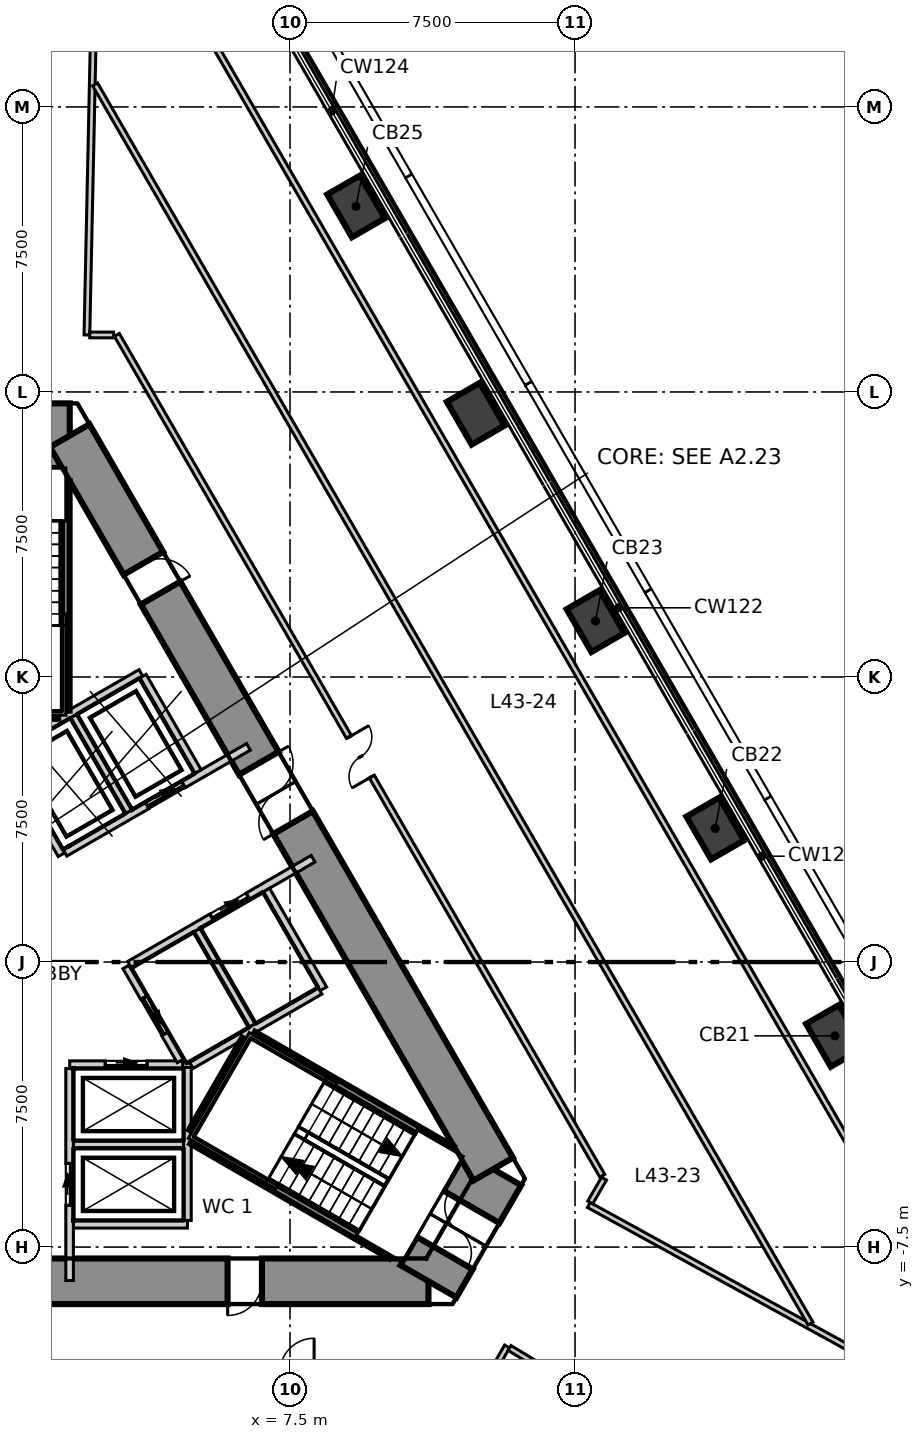
"""IFC4 building model, lengths in metres.
Left out: names, types, materials, properties, quantities, classifications, styles, units other than length and angle.
Written with IfcOpenShell. Run it as: python <this file> out.ifc"""

import sys

from ifc_helpers import new_model, si_unit, direction, frame, frame_2d, origin, origin_2d, place, context, subcontext, project, spatial, polyline, rectangle, outline, extrude, element, fill, save


model = new_model("IFC4")
c1 = context("Model", 3, precision=1e-05, world=origin(), true_north=direction((0.0, 1.0)))
c2 = subcontext(c1, "Body", "Model", "MODEL_VIEW")
j1 = project(units=[si_unit("LENGTHUNIT", "METRE"), si_unit("PLANEANGLEUNIT", "RADIAN")], contexts=[c1])
p1 = place(None, origin())
s1 = spatial("IfcSite", under=j1, at=p1, CompositionType="ELEMENT")
p2 = place(p1, origin())
s2 = spatial("IfcBuilding", under=s1, at=p2, CompositionType="ELEMENT")
p3 = place(p2, frame((0.0, 0.0, 185.3)))
s3 = spatial("IfcBuildingStorey", under=s2, at=p3, CompositionType="ELEMENT", Elevation=185.3)
p4 = place(p3, frame((1.703, 13.85, -0.6), z_axis=(0.0, 0.0, 1.0), x_axis=(-1.0, 0.0, 0.0)))
e1 = element("IfcWall", 1, at=p4, inside=s3, PredefinedType="SHEAR", context=c2, shape_type="SweptSolid", body=[
    extrude(outline(polyline([(-0.202, -0.85), (1.703, -0.85), (3.608, -0.85), (3.204, 0.85), (1.703, 0.85), (0.202, 0.85), (-0.202, -0.85)])), origin(), (0.0, 0.0, 1.0), 6.3),
])
p5 = place(p4, frame((0.859, 0.0, 0.6)))
e2 = element("IfcOpeningElement", 2, at=p5, cuts=e1, PredefinedType="OPENING", context=c2, shape_type="SweptSolid", body=[
    extrude(rectangle(XDim=1.4, YDim=2.1, at=frame_2d((0.7, 1.05))), frame((0.0, 0.86, 0.0), z_axis=(0.0, -1.0, 0.0), x_axis=(1.0, 0.0, 0.0)), (0.0, 0.0, 1.0), 1.72),
])
p6 = place(p3, frame((-11.143, -8.4, -0.6), z_axis=(0.0, 0.0, 1.0), x_axis=(1.0, 0.0, 0.0)))
e3 = element("IfcWall", 3, at=p6, inside=s3, PredefinedType="SHEAR", context=c2, shape_type="SweptSolid", body=[
    extrude(outline(polyline([(-0.635, -0.6), (1.328, -0.6), (3.291, -0.6), (5.254, -0.6), (7.217, -0.6), (9.18, -0.6), (11.143, -0.6), (13.106, -0.6), (15.069, -0.6), (17.032, -0.6), (18.995, -0.6), (20.958, -0.6), (22.921, -0.6), (21.651, 0.6), (19.74, 0.6), (17.83, 0.6), (15.919, 0.6), (14.009, 0.6), (12.098, 0.6), (10.188, 0.6), (8.277, 0.6), (6.367, 0.6), (4.456, 0.6), (2.546, 0.6), (0.635, 0.6), (-0.635, -0.6)])), origin(), (0.0, 0.0, 1.0), 6.3),
])
p7 = place(p6, frame((17.002, 0.0, 0.6)))
e4 = element("IfcOpeningElement", 4, at=p7, cuts=e3, PredefinedType="OPENING", context=c2, shape_type="SweptSolid", body=[
    extrude(rectangle(XDim=0.9, YDim=2.1, at=frame_2d((0.45, 1.05))), frame((0.0, 0.61, 0.0), z_axis=(0.0, -1.0, 0.0), x_axis=(1.0, 0.0, 0.0)), (0.0, 0.0, 1.0), 1.22),
])
p8 = place(p3, frame((11.143, -8.4, -0.6), z_axis=(0.0, 0.0, 1.0), x_axis=(0.499939613464, 0.86606026516, 0.0)))
e5 = element("IfcWall", 5, at=p8, inside=s3, PredefinedType="SHEAR", context=c2, shape_type="SweptSolid", body=[
    extrude(outline(polyline([(-0.202, -0.85), (1.703, -0.85), (3.608, -0.85), (3.204, 0.85), (1.703, 0.85), (0.202, 0.85), (-0.202, -0.85)])), origin(), (0.0, 0.0, 1.0), 6.3),
])
p9 = place(p8, frame((0.859, 0.0, 0.6)))
e6 = element("IfcOpeningElement", 6, at=p9, cuts=e5, PredefinedType="OPENING", context=c2, shape_type="SweptSolid", body=[
    extrude(rectangle(XDim=1.4, YDim=2.1, at=frame_2d((0.7, 1.05))), frame((0.0, 0.86, 0.0), z_axis=(0.0, -1.0, 0.0), x_axis=(1.0, 0.0, 0.0)), (0.0, 0.0, 1.0), 1.72),
])
p10 = place(p3, frame((12.846, -5.45, -0.6), z_axis=(0.0, 0.0, 1.0), x_axis=(-0.500005991004, 0.866021944849, 0.0)))
e7 = element("IfcWall", 7, at=p10, inside=s3, PredefinedType="SHEAR", context=c2, shape_type="SweptSolid", body=[
    extrude(outline(polyline([(-0.635, -0.6), (1.328, -0.6), (3.291, -0.6), (5.254, -0.6), (7.217, -0.6), (9.18, -0.6), (11.143, -0.6), (13.106, -0.6), (15.069, -0.6), (17.032, -0.6), (18.995, -0.6), (20.958, -0.6), (22.921, -0.6), (21.651, 0.6), (19.74, 0.6), (17.83, 0.6), (15.919, 0.6), (14.009, 0.6), (12.098, 0.6), (10.188, 0.6), (8.277, 0.6), (6.367, 0.6), (4.456, 0.6), (2.546, 0.6), (0.635, 0.6), (-0.635, -0.6)])), origin(), (0.0, 0.0, 1.0), 6.3),
])
p11 = place(p10, frame((10.531, 0.0, 0.6)))
e8 = element("IfcOpeningElement", 8, at=p11, cuts=e7, PredefinedType="OPENING", context=c2, shape_type="SweptSolid", body=[
    extrude(rectangle(XDim=1.8, YDim=2.1, at=frame_2d((0.9, 1.05))), frame((0.0, 0.61, 0.0), z_axis=(0.0, -1.0, 0.0), x_axis=(1.0, 0.0, 0.0)), (0.0, 0.0, 1.0), 1.22),
])
p12 = place(p10, frame((17.506, 0.0, 0.6)))
e9 = element("IfcOpeningElement", 9, at=p12, cuts=e7, PredefinedType="OPENING", context=c2, shape_type="SweptSolid", body=[
    extrude(rectangle(XDim=0.9, YDim=2.1, at=frame_2d((0.45, 1.05))), frame((0.0, 0.61, 0.0), z_axis=(0.0, -1.0, 0.0), x_axis=(1.0, 0.0, 0.0)), (0.0, 0.0, 1.0), 1.22),
])
for number, where, z_axis, x_axis in (
    (10, (21.838, -1.942, -0.6), (0.0, 0.0, 1.0), (-0.5, 0.866, 0.0)),
    (11, (18.688, 3.514, -0.6), (0.0, 0.0, 1.0), (-0.5, 0.866, 0.0)),
    (12, (15.538, 8.971, -0.6), (0.0, 0.0, 1.0), (-0.5, 0.866, 0.0)),
    (13, (12.387, 14.427, -0.6), (0.0, 0.0, 1.0), (-0.5, 0.866, 0.0)),
    (14, (9.237, 19.883, -0.6), (0.0, 0.0, 1.0), (-0.5, 0.866, 0.0)),
):
    element("IfcColumn", number, at=place(p3, frame(where, z_axis=z_axis, x_axis=x_axis)), inside=s3, PredefinedType="COLUMN", context=c2, shape_type="SweptSolid", body=[
        extrude(rectangle(XDim=1.3, YDim=1.0, at=origin_2d()), origin(), (0.0, 0.0, 1.0), 6.3),
    ])
p13 = place(p3, frame((2.155, 16.5, 0.0), z_axis=(0.0, 0.0, 1.0), x_axis=(0.021421622411, 0.999770530719, 0.0)))
e15 = element("IfcWall", 15, at=p13, inside=s3, PredefinedType="PARTITIONING", context=c2, shape_type="SweptSolid", body=[
    extrude(rectangle(XDim=11.157, YDim=0.15, at=frame_2d((5.579, 0.0))), origin(), (0.0, 0.0, 1.0), 5.0),
])
p14 = place(p3, frame((2.98, 28.52, 0.0), z_axis=(0.0, 0.0, 1.0), x_axis=(0.500012382508, -0.866018254622, 0.0)))
e16 = element("IfcWall", 16, at=p14, inside=s3, PredefinedType="PARTITIONING", context=c2, shape_type="SweptSolid", body=[
    extrude(rectangle(XDim=46.505, YDim=0.15, at=frame_2d((23.252, 0.0))), origin(), (0.0, 0.0, 1.0), 5.7),
])
p15 = place(p3, frame((15.362, -6.392, 0.0), z_axis=(0.0, 0.0, 1.0), x_axis=(0.876310300544, -0.481747088378, 0.0)))
e17 = element("IfcWall", 17, at=p15, inside=s3, PredefinedType="PARTITIONING", context=c2, shape_type="SweptSolid", body=[
    extrude(rectangle(XDim=10.974, YDim=0.15, at=frame_2d((5.487, 0.0))), origin(), (0.0, 0.0, 1.0), 5.0),
])
p16 = place(p15, frame((8.33, 0.0, 0.0)))
e18 = element("IfcOpeningElement", 18, at=p16, cuts=e17, PredefinedType="OPENING", context=c2, shape_type="SweptSolid", body=[
    extrude(rectangle(XDim=1.2, YDim=2.1, at=frame_2d((0.6, 1.05))), frame((0.0, 0.085, 0.0), z_axis=(0.0, -1.0, 0.0), x_axis=(1.0, 0.0, 0.0)), (0.0, 0.0, 1.0), 0.17),
])
p17 = place(p3, frame((15.4, -6.327, 0.0), z_axis=(0.0, 0.0, 1.0), x_axis=(0.500092185955, 0.865972173656, 0.0)))
e19 = element("IfcWall", 19, at=p17, inside=s3, PredefinedType="PARTITIONING", context=c2, shape_type="SweptSolid", body=[
    extrude(rectangle(XDim=0.724, YDim=0.15, at=frame_2d((0.362, 0.0))), origin(), (0.0, 0.0, 1.0), 5.7),
])
p18 = place(p3, frame((2.944, 16.5, 0.0), z_axis=(0.0, 0.0, 1.0), x_axis=(0.500001499409, -0.866024538099, 0.0)))
e20 = element("IfcWall", 20, at=p18, inside=s3, PredefinedType="PARTITIONING", context=c2, shape_type="SweptSolid", body=[
    extrude(rectangle(XDim=25.548, YDim=0.15, at=frame_2d((12.774, 0.0))), origin(), (0.0, 0.0, 1.0), 5.7),
])
p19 = place(p18, frame((12.217, 0.0, 0.0)))
e21 = element("IfcOpeningElement", 21, at=p19, cuts=e20, PredefinedType="OPENING", context=c2, shape_type="SweptSolid", body=[
    extrude(rectangle(XDim=1.2, YDim=2.1, at=frame_2d((0.6, 1.05))), frame((0.0, 0.085, 0.0), z_axis=(0.0, -1.0, 0.0), x_axis=(1.0, 0.0, 0.0)), (0.0, 0.0, 1.0), 0.17),
])
p20 = place(p3, frame((2.23, 16.5, 0.0), z_axis=(0.0, 0.0, 1.0), x_axis=(1.0, 0.0, 0.0)))
e22 = element("IfcWall", 22, at=p20, inside=s3, PredefinedType="PARTITIONING", context=c2, shape_type="SweptSolid", body=[
    extrude(rectangle(XDim=0.628, YDim=0.15, at=frame_2d((0.314, 0.0))), origin(), (0.0, 0.0, 1.0), 5.7),
])
p21 = place(p3, frame((2.371, 23.093, 0.0), z_axis=(0.0, 0.0, 1.0), x_axis=(0.500006092323, -0.866021886352, 0.0)))
e23 = element("IfcWall", 23, at=p21, inside=s3, PredefinedType="PARTITIONING", context=c2, shape_type="SweptSolid", body=[
    extrude(rectangle(XDim=37.651, YDim=0.15, at=frame_2d((18.826, 0.0))), origin(), (0.0, 0.0, 1.0), 5.7),
])
p22 = place(p3, frame((12.86, -10.725, 0.0), z_axis=(0.0, 0.0, 1.0), x_axis=(0.500133030451, 0.865948584993, 0.0)))
e24 = element("IfcWall", 24, at=p22, inside=s3, PredefinedType="PARTITIONING", context=c2, shape_type="SweptSolid", body=[
    extrude(rectangle(XDim=0.703, YDim=0.15, at=frame_2d((0.352, 0.0))), origin(), (0.0, 0.0, 1.0), 5.7),
])
p23 = place(p3, frame((13.276, -10.155, 0.0), z_axis=(0.0, 0.0, 1.0), x_axis=(0.855137762332, -0.518400817355, 0.0)))
e25 = element("IfcWall", 25, at=p23, inside=s3, PredefinedType="PARTITIONING", context=c2, shape_type="SweptSolid", body=[
    extrude(rectangle(XDim=6.115, YDim=0.15, at=frame_2d((3.057, 0.0))), origin(), (0.0, 0.0, 1.0), 5.0),
])
p24 = place(p3, frame((1.8, -4.8, 0.0), z_axis=(0.0, 0.0, 1.0), x_axis=(1.0, 0.0, 0.0)))
e26 = element("IfcWall", 26, at=p24, inside=s3, PredefinedType="SOLIDWALL", context=c2, shape_type="SweptSolid", body=[
    extrude(rectangle(XDim=2.9, YDim=0.2, at=frame_2d((1.45, 0.0))), origin(), (0.0, 0.0, 1.0), 5.7),
])
p25 = place(p3, frame((1.8, -6.9, 0.0), z_axis=(0.0, 0.0, 1.0), x_axis=(1.0, 0.0, 0.0)))
e27 = element("IfcWall", 27, at=p25, inside=s3, PredefinedType="SOLIDWALL", context=c2, shape_type="SweptSolid", body=[
    extrude(rectangle(XDim=3.0, YDim=0.2, at=frame_2d((1.5, 0.0))), origin(), (0.0, 0.0, 1.0), 5.7),
])
p26 = place(p3, frame((1.703, -2.7, 0.0), z_axis=(0.0, 0.0, 1.0), x_axis=(1.0, 0.0, 0.0)))
e28 = element("IfcWall", 28, at=p26, inside=s3, PredefinedType="SOLIDWALL", context=c2, shape_type="SweptSolid", body=[
    extrude(rectangle(XDim=2.973, YDim=0.2, at=frame_2d((1.487, 0.0))), origin(), (0.0, 0.0, 1.0), 5.7),
])
p27 = place(p26, frame((0.936, 0.0, 0.0)))
e29 = element("IfcOpeningElement", 29, at=p27, cuts=e28, PredefinedType="OPENING", context=c2, shape_type="SweptSolid", body=[
    extrude(rectangle(XDim=1.1, YDim=2.1, at=frame_2d((0.55, 1.05))), frame((0.0, 0.11, 0.0), z_axis=(0.0, -1.0, 0.0), x_axis=(1.0, 0.0, 0.0)), (0.0, 0.0, 1.0), 0.22),
])
p28 = place(p3, frame((-0.002, 5.541, 0.0), z_axis=(0.0, 0.0, 1.0), x_axis=(0.86600155993, 0.500041296494, 0.0)))
e30 = element("IfcWall", 30, at=p28, inside=s3, PredefinedType="SOLIDWALL", context=c2, shape_type="SweptSolid", body=[
    extrude(rectangle(XDim=4.132, YDim=0.2, at=frame_2d((2.066, 0.0))), origin(), (0.0, 0.0, 1.0), 5.7),
])
p29 = place(p3, frame((0.0, 5.4, 0.0), z_axis=(0.0, 0.0, 1.0), x_axis=(0.500103862429, -0.865965430478, 0.0)))
e31 = element("IfcWall", 31, at=p29, inside=s3, PredefinedType="SOLIDWALL", context=c2, shape_type="SweptSolid", body=[
    extrude(rectangle(XDim=2.973, YDim=0.2, at=frame_2d((1.487, 0.0))), origin(), (0.0, 0.0, 1.0), 5.7),
])
p30 = place(p29, frame((0.937, 0.0, 0.0)))
e32 = element("IfcOpeningElement", 32, at=p30, cuts=e31, PredefinedType="OPENING", context=c2, shape_type="SweptSolid", body=[
    extrude(rectangle(XDim=1.1, YDim=2.1, at=frame_2d((0.55, 1.05))), frame((0.0, 0.11, 0.0), z_axis=(0.0, -1.0, 0.0), x_axis=(1.0, 0.0, 0.0)), (0.0, 0.0, 1.0), 0.22),
])
p31 = place(p3, frame((3.19, -0.125, 0.0), z_axis=(0.0, 0.0, 1.0), x_axis=(0.499988658015, -0.866031951983, 0.0)))
e33 = element("IfcWall", 33, at=p31, inside=s3, PredefinedType="SOLIDWALL", context=c2, shape_type="SweptSolid", body=[
    extrude(rectangle(XDim=2.858, YDim=0.2, at=frame_2d((1.429, 0.0))), origin(), (0.0, 0.0, 1.0), 5.7),
])
p32 = place(p31, frame((0.936, 0.0, 0.0)))
e34 = element("IfcOpeningElement", 34, at=p32, cuts=e33, PredefinedType="OPENING", context=c2, shape_type="SweptSolid", body=[
    extrude(rectangle(XDim=1.1, YDim=2.1, at=frame_2d((0.55, 1.05))), frame((0.0, 0.11, 0.0), z_axis=(0.0, -1.0, 0.0), x_axis=(1.0, 0.0, 0.0)), (0.0, 0.0, 1.0), 0.22),
])
p33 = place(p3, frame((1.577, 2.874, 0.0), z_axis=(0.0, 0.0, 1.0), x_axis=(0.866068955414, 0.499924558776, 0.0)))
e35 = element("IfcWall", 35, at=p33, inside=s3, PredefinedType="SOLIDWALL", context=c2, shape_type="SweptSolid", body=[
    extrude(rectangle(XDim=5.577, YDim=0.2, at=frame_2d((2.789, 0.0))), origin(), (0.0, 0.0, 1.0), 5.7),
])
p34 = place(p33, frame((2.497, 0.0, 0.0)))
e36 = element("IfcOpeningElement", 36, at=p34, cuts=e35, PredefinedType="OPENING", context=c2, shape_type="SweptSolid", body=[
    extrude(rectangle(XDim=1.1, YDim=2.1, at=frame_2d((0.55, 1.05))), frame((0.0, 0.11, 0.0), z_axis=(0.0, -1.0, 0.0), x_axis=(1.0, 0.0, 0.0)), (0.0, 0.0, 1.0), 0.22),
])
p35 = place(p3, frame((1.7, -8.38, 0.0), z_axis=(0.0, 0.0, 1.0), x_axis=(0.0, 1.0, 0.0)))
e37 = element("IfcWall", 37, at=p35, inside=s3, PredefinedType="SOLIDWALL", context=c2, shape_type="SweptSolid", body=[
    extrude(rectangle(XDim=5.577, YDim=0.2, at=frame_2d((2.789, 0.0))), origin(), (0.0, 0.0, 1.0), 5.7),
])
p36 = place(p35, frame((1.98, 0.0, 0.0)))
e38 = element("IfcOpeningElement", 38, at=p36, cuts=e37, PredefinedType="OPENING", context=c2, shape_type="SweptSolid", body=[
    extrude(rectangle(XDim=1.1, YDim=2.1, at=frame_2d((0.55, 1.05))), frame((0.0, 0.11, 0.0), z_axis=(0.0, -1.0, 0.0), x_axis=(1.0, 0.0, 0.0)), (0.0, 0.0, 1.0), 0.22),
])
p37 = place(p3, frame((4.8, -6.8, 0.0), z_axis=(0.0, 0.0, 1.0), x_axis=(0.0, 1.0, 0.0)))
e39 = element("IfcWall", 39, at=p37, inside=s3, PredefinedType="SOLIDWALL", context=c2, shape_type="SweptSolid", body=[
    extrude(rectangle(XDim=4.029, YDim=0.2, at=frame_2d((2.015, 0.0))), origin(), (0.0, 0.0, 1.0), 5.7),
])
p38 = place(p3, frame((3.278, -0.071, 0.0), z_axis=(0.0, 0.0, 1.0), x_axis=(0.865938393773, 0.500150675487, 0.0)))
e40 = element("IfcWall", 40, at=p38, inside=s3, PredefinedType="SOLIDWALL", context=c2, shape_type="SweptSolid", body=[
    extrude(rectangle(XDim=5.576, YDim=0.2, at=frame_2d((2.788, 0.0))), origin(), (0.0, 0.0, 1.0), 5.7),
])
p39 = place(p38, frame((2.497, 0.0, 0.0)))
e41 = element("IfcOpeningElement", 41, at=p39, cuts=e40, PredefinedType="OPENING", context=c2, shape_type="SweptSolid", body=[
    extrude(rectangle(XDim=1.1, YDim=2.1, at=frame_2d((0.55, 1.05))), frame((0.0, 0.11, 0.0), z_axis=(0.0, -1.0, 0.0), x_axis=(1.0, 0.0, 0.0)), (0.0, 0.0, 1.0), 0.22),
])
p40 = place(p3, frame((3.626, 7.52, 0.0), z_axis=(0.0, 0.0, 1.0), x_axis=(0.500060147554, -0.865990674793, 0.0)))
e42 = element("IfcWall", 42, at=p40, inside=s3, PredefinedType="SOLIDWALL", context=c2, shape_type="SweptSolid", body=[
    extrude(rectangle(XDim=2.9, YDim=0.2, at=frame_2d((1.45, 0.0))), origin(), (0.0, 0.0, 1.0), 5.7),
])
p41 = place(p3, frame((6.876, 1.891, 0.0), z_axis=(0.0, 0.0, 1.0), x_axis=(0.499990139034, -0.866031096941, 0.0)))
e43 = element("IfcWall", 43, at=p41, inside=s3, PredefinedType="SOLIDWALL", context=c2, shape_type="SweptSolid", body=[
    extrude(rectangle(XDim=3.0, YDim=0.2, at=frame_2d((1.5, 0.0))), origin(), (0.0, 0.0, 1.0), 5.7),
])
for number, where, z_axis, x_axis in (
    (44, (1.807, 6.47, 0.0), (0.0, 0.0, 1.0), (0.5, -0.866, 0.0)),
    (45, (5.057, 0.841, 0.0), (0.0, 0.0, 1.0), (0.5, -0.866, 0.0)),
):
    element("IfcWall", number, at=place(p3, frame(where, z_axis=z_axis, x_axis=x_axis)), inside=s3, PredefinedType="SOLIDWALL", context=c2, shape_type="SweptSolid", body=[
        extrude(rectangle(XDim=2.9, YDim=0.2, at=frame_2d((1.45, 0.0))), origin(), (0.0, 0.0, 1.0), 5.7),
    ])
p42 = place(p3, frame((4.9, -2.714, 0.0), z_axis=(0.0, 0.0, 1.0), x_axis=(0.865992350556, 0.500057245502, 0.0)))
e46 = element("IfcWall", 46, at=p42, inside=s3, PredefinedType="SOLIDWALL", context=c2, shape_type="SweptSolid", body=[
    extrude(rectangle(XDim=3.914, YDim=0.2, at=frame_2d((1.957, 0.0))), origin(), (0.0, 0.0, 1.0), 5.7),
])
p43 = place(p3, frame((1.6, 6.615, 0.0), z_axis=(0.0, 0.0, 1.0), x_axis=(0.0, 1.0, 0.0)))
e47 = element("IfcWall", 47, at=p43, inside=s3, PredefinedType="SOLIDWALL", context=c2, shape_type="SweptSolid", body=[
    extrude(rectangle(XDim=6.04, YDim=0.2, at=frame_2d((3.02, 0.0))), origin(), (0.0, 0.0, 1.0), 5.7),
])
p44 = place(p3, frame((-1.4, 6.5, 0.0), z_axis=(0.0, 0.0, 1.0), x_axis=(1.0, 0.0, 0.0)))
e48 = element("IfcWall", 48, at=p44, inside=s3, PredefinedType="SOLIDWALL", context=c2, shape_type="SweptSolid", body=[
    extrude(rectangle(XDim=2.8, YDim=0.2, at=frame_2d((1.4, 0.0))), origin(), (0.0, 0.0, 1.0), 5.7),
])
p45 = place(p3, frame((4.929, -4.693, 0.0), z_axis=(0.0, 0.0, 1.0), x_axis=(0.866048276411, -0.499960381356, 0.0)))
e49 = element("IfcWall", 49, at=p45, inside=s3, PredefinedType="SOLIDWALL", context=c2, shape_type="SweptSolid", body=[
    extrude(rectangle(XDim=6.04, YDim=0.2, at=frame_2d((3.02, 0.0))), origin(), (0.0, 0.0, 1.0), 5.7),
])
p46 = place(p3, frame((4.929, -4.462, 0.0), z_axis=(0.0, 0.0, 1.0), x_axis=(0.500200581029, 0.865909567298, 0.0)))
e50 = element("IfcWall", 50, at=p46, inside=s3, PredefinedType="SOLIDWALL", context=c2, shape_type="SweptSolid", body=[
    extrude(rectangle(XDim=2.799, YDim=0.2, at=frame_2d((1.399, 0.0))), origin(), (0.0, 0.0, 1.0), 5.7),
])
p47 = place(p3, frame((6.529, -1.922, 0.0), z_axis=(0.0, 0.0, 1.0), x_axis=(0.866048276411, -0.499960381356, 0.0)))
e51 = element("IfcWall", 51, at=p47, inside=s3, PredefinedType="SOLIDWALL", context=c2, shape_type="SweptSolid", body=[
    extrude(rectangle(XDim=6.04, YDim=0.2, at=frame_2d((3.02, 0.0))), origin(), (0.0, 0.0, 1.0), 5.7),
])
p48 = place(p32, origin())
e52 = element("IfcDoor", 52, at=p48, inside=s3, OperationType="SLIDING_TO_LEFT", PredefinedType="DOOR", context=c2, shape_type="SweptSolid", body=[
    extrude(rectangle(XDim=1.1, YDim=2.1, at=frame_2d((0.55, 1.05))), frame((0.0, 0.025, 0.0), z_axis=(0.0, -1.0, 0.0), x_axis=(1.0, 0.0, 0.0)), (0.0, 0.0, 1.0), 0.05),
])
fill(e34, e52)
p49 = place(p39, origin())
e53 = element("IfcDoor", 53, at=p49, inside=s3, OperationType="SLIDING_TO_LEFT", PredefinedType="DOOR", context=c2, shape_type="SweptSolid", body=[
    extrude(rectangle(XDim=1.1, YDim=2.1, at=frame_2d((0.55, 1.05))), frame((0.0, 0.025, 0.0), z_axis=(0.0, -1.0, 0.0), x_axis=(1.0, 0.0, 0.0)), (0.0, 0.0, 1.0), 0.05),
])
fill(e41, e53)
p50 = place(p27, origin())
e54 = element("IfcDoor", 54, at=p50, inside=s3, OperationType="SLIDING_TO_LEFT", PredefinedType="DOOR", context=c2, shape_type="SweptSolid", body=[
    extrude(rectangle(XDim=1.1, YDim=2.1, at=frame_2d((0.55, 1.05))), frame((0.0, 0.025, 0.0), z_axis=(0.0, -1.0, 0.0), x_axis=(1.0, 0.0, 0.0)), (0.0, 0.0, 1.0), 0.05),
])
fill(e29, e54)
p51 = place(p36, origin())
e55 = element("IfcDoor", 55, at=p51, inside=s3, OperationType="SLIDING_TO_LEFT", PredefinedType="DOOR", context=c2, shape_type="SweptSolid", body=[
    extrude(rectangle(XDim=1.1, YDim=2.1, at=frame_2d((0.55, 1.05))), frame((0.0, 0.025, 0.0), z_axis=(0.0, -1.0, 0.0), x_axis=(1.0, 0.0, 0.0)), (0.0, 0.0, 1.0), 0.05),
])
fill(e38, e55)
p52 = place(p34, origin())
e56 = element("IfcDoor", 56, at=p52, inside=s3, OperationType="SLIDING_TO_LEFT", PredefinedType="DOOR", context=c2, shape_type="SweptSolid", body=[
    extrude(rectangle(XDim=1.1, YDim=2.1, at=frame_2d((0.55, 1.05))), frame((0.0, 0.025, 0.0), z_axis=(0.0, -1.0, 0.0), x_axis=(1.0, 0.0, 0.0)), (0.0, 0.0, 1.0), 0.05),
])
fill(e36, e56)
p53 = place(p19, origin())
e57 = element("IfcDoor", 57, at=p53, inside=s3, OperationType="DOUBLE_DOOR_SINGLE_SWING", PredefinedType="DOOR", context=c2, shape_type="SweptSolid", body=[
    extrude(rectangle(XDim=1.2, YDim=2.1, at=frame_2d((0.6, 1.05))), frame((0.0, 0.025, 0.0), z_axis=(0.0, -1.0, 0.0), x_axis=(1.0, 0.0, 0.0)), (0.0, 0.0, 1.0), 0.05),
])
fill(e21, e57)
p54 = place(p11, origin())
e58 = element("IfcDoor", 58, at=p54, inside=s3, OperationType="DOUBLE_DOOR_SINGLE_SWING", PredefinedType="DOOR", context=c2, shape_type="SweptSolid", body=[
    extrude(rectangle(XDim=1.8, YDim=2.1, at=frame_2d((0.9, 1.05))), frame((0.0, 0.025, 0.0), z_axis=(0.0, -1.0, 0.0), x_axis=(1.0, 0.0, 0.0)), (0.0, 0.0, 1.0), 0.05),
])
fill(e8, e58)
p55 = place(p9, origin())
e59 = element("IfcDoor", 59, at=p55, inside=s3, OperationType="DOUBLE_DOOR_SINGLE_SWING", PredefinedType="DOOR", context=c2, shape_type="SweptSolid", body=[
    extrude(rectangle(XDim=1.4, YDim=2.1, at=frame_2d((0.7, 1.05))), frame((0.0, 0.025, 0.0), z_axis=(0.0, -1.0, 0.0), x_axis=(1.0, 0.0, 0.0)), (0.0, 0.0, 1.0), 0.05),
])
fill(e6, e59)
p56 = place(p7, origin())
e60 = element("IfcDoor", 60, at=p56, inside=s3, OperationType="SINGLE_SWING_LEFT", PredefinedType="DOOR", context=c2, shape_type="SweptSolid", body=[
    extrude(rectangle(XDim=0.9, YDim=2.1, at=frame_2d((0.45, 1.05))), frame((0.0, 0.325, 0.0), z_axis=(0.0, -1.0, 0.0), x_axis=(1.0, 0.0, 0.0)), (0.0, 0.0, 1.0), 0.05),
])
fill(e4, e60)
p57 = place(p12, origin())
e61 = element("IfcDoor", 61, at=p57, inside=s3, OperationType="SINGLE_SWING_LEFT", PredefinedType="DOOR", context=c2, shape_type="SweptSolid", body=[
    extrude(rectangle(XDim=0.9, YDim=2.1, at=frame_2d((0.45, 1.05))), frame((0.0, 0.025, 0.0), z_axis=(0.0, -1.0, 0.0), x_axis=(1.0, 0.0, 0.0)), (0.0, 0.0, 1.0), 0.05),
])
fill(e9, e61)
save(model, sys.argv[1])
